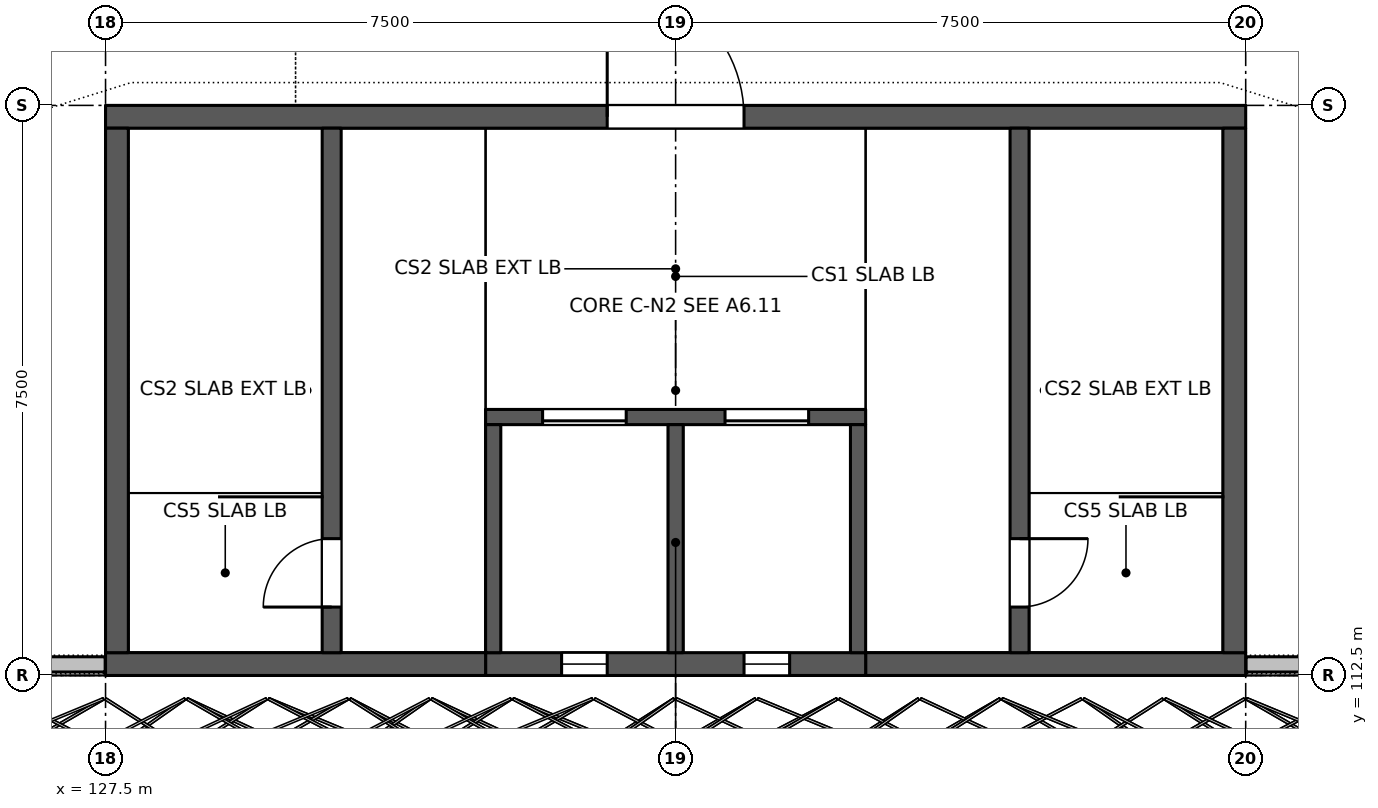
"""IFC4 building model, lengths in metres.
Left out: names, types, materials, properties, quantities, classifications, styles, units other than length and angle.
Written with IfcOpenShell. Run it as: python <this file> out.ifc"""

import sys

from ifc_helpers import new_model, si_unit, direction, frame, frame_2d, origin, place, context, subcontext, project, spatial, polyline, rectangle, outline, extrude, element, fill, save


model = new_model("IFC4")
c1 = context("Model", 3, precision=1e-05, world=origin(), true_north=direction((0.0, 1.0)))
c2 = subcontext(c1, "Body", "Model", "MODEL_VIEW")
j1 = project(units=[si_unit("LENGTHUNIT", "METRE"), si_unit("PLANEANGLEUNIT", "RADIAN")], contexts=[c1])
p1 = place(None, origin())
s1 = spatial("IfcSite", under=j1, at=p1, CompositionType="ELEMENT")
p2 = place(p1, origin())
s2 = spatial("IfcBuilding", under=s1, at=p2, CompositionType="ELEMENT")
p3 = place(p2, frame((0.0, 0.0, 13.2)))
s3 = spatial("IfcBuildingStorey", under=s2, at=p3, CompositionType="ELEMENT", Elevation=13.2)
for number, where, z_axis, x_axis in (
    (1, (120.002, 112.646, 0.0), (0.0, 0.0, 1.0), (1.0, 0.0, 0.0)),
    (2, (142.505, 112.646, 0.0), (0.0, 0.0, 1.0), (1.0, 0.0, 0.0)),
):
    element("IfcWall", number, at=place(p3, frame(where, z_axis=z_axis, x_axis=x_axis)), inside=s3, PredefinedType="SOLIDWALL", context=c2, shape_type="SweptSolid", body=[
        extrude(rectangle(XDim=7.493, YDim=0.2, at=frame_2d((3.747, 0.0))), origin(), (0.0, 0.0, 1.0), 1.2),
    ])
p4 = place(p3, frame((127.5, 119.85, 0.0), z_axis=(0.0, 0.0, 1.0), x_axis=(1.0, 0.0, 0.0)))
e3 = element("IfcWall", 3, at=p4, inside=s3, PredefinedType="SHEAR", context=c2, shape_type="SweptSolid", body=[
    extrude(rectangle(XDim=15.0, YDim=0.3, at=frame_2d((7.5, 0.0))), origin(), (0.0, 0.0, 1.0), 3.3),
])
p5 = place(p4, frame((6.6, 0.0, 0.0)))
e4 = element("IfcOpeningElement", 4, at=p5, cuts=e3, PredefinedType="OPENING", context=c2, shape_type="SweptSolid", body=[
    extrude(rectangle(XDim=1.8, YDim=2.1, at=frame_2d((0.9, 1.05))), frame((0.0, 0.16, 0.0), z_axis=(0.0, -1.0, 0.0), x_axis=(1.0, 0.0, 0.0)), (0.0, 0.0, 1.0), 0.32),
])
p6 = place(p3, frame((142.5, 112.65, 0.0), z_axis=(0.0, 0.0, 1.0), x_axis=(-1.0, 0.0, 0.0)))
e5 = element("IfcWall", 5, at=p6, inside=s3, PredefinedType="SHEAR", context=c2, shape_type="SweptSolid", body=[
    extrude(rectangle(XDim=5.0, YDim=0.3, at=frame_2d((2.5, 0.0))), origin(), (0.0, 0.0, 1.0), 3.875),
])
p7 = place(p3, frame((137.5, 112.65, 0.0), z_axis=(0.0, 0.0, 1.0), x_axis=(-1.0, 0.0, 0.0)))
e6 = element("IfcWall", 6, at=p7, inside=s3, PredefinedType="SHEAR", context=c2, shape_type="SweptSolid", body=[
    extrude(outline(polyline([(0.0, 0.0), (5.0, 0.0), (5.0, 4.8), (0.0, 7.8), (0.0, 0.0)])), frame((0.0, 0.15, 0.0), z_axis=(0.0, -1.0, 0.0), x_axis=(1.0, 0.0, 0.0)), (0.0, 0.0, 1.0), 0.3),
])
p8 = place(p7, frame((1.0, 0.0, 0.3)))
e7 = element("IfcOpeningElement", 7, at=p8, cuts=e6, PredefinedType="OPENING", context=c2, shape_type="SweptSolid", body=[
    extrude(rectangle(XDim=0.6, YDim=2.7, at=frame_2d((0.3, 1.35))), frame((0.0, 0.16, 0.0), z_axis=(0.0, -1.0, 0.0), x_axis=(1.0, 0.0, 0.0)), (0.0, 0.0, 1.0), 0.32),
])
p9 = place(p7, frame((3.4, 0.0, 0.3)))
e8 = element("IfcOpeningElement", 8, at=p9, cuts=e6, PredefinedType="OPENING", context=c2, shape_type="SweptSolid", body=[
    extrude(rectangle(XDim=0.6, YDim=2.7, at=frame_2d((0.3, 1.35))), frame((0.0, 0.16, 0.0), z_axis=(0.0, -1.0, 0.0), x_axis=(1.0, 0.0, 0.0)), (0.0, 0.0, 1.0), 0.32),
])
p10 = place(p3, frame((132.5, 112.65, 0.0), z_axis=(0.0, 0.0, 1.0), x_axis=(-1.0, 0.0, 0.0)))
e9 = element("IfcWall", 9, at=p10, inside=s3, PredefinedType="SHEAR", context=c2, shape_type="SweptSolid", body=[
    extrude(rectangle(XDim=5.0, YDim=0.3, at=frame_2d((2.5, 0.0))), origin(), (0.0, 0.0, 1.0), 3.875),
])
for number, where, z_axis, x_axis in (
    (10, (142.35, 119.7, 0.0), (0.0, 0.0, 1.0), (0.0, -1.0, 0.0)),
    (11, (127.65, 119.7, 0.0), (0.0, 0.0, 1.0), (0.0, -1.0, 0.0)),
):
    element("IfcWall", number, at=place(p3, frame(where, z_axis=z_axis, x_axis=x_axis)), inside=s3, PredefinedType="SHEAR", context=c2, shape_type="SweptSolid", body=[
        extrude(outline(polyline([(0.0, 0.0), (6.9, 0.0), (6.9, 3.875), (0.0, 3.3), (0.0, 0.0)])), frame((0.0, 0.15, 0.0), z_axis=(0.0, -1.0, 0.0), x_axis=(1.0, 0.0, 0.0)), (0.0, 0.0, 1.0), 0.3),
    ])
p11 = place(p3, frame((139.525, 119.7, 0.0), z_axis=(0.0, 0.0, 1.0), x_axis=(0.0, -1.0, 0.0)))
e12 = element("IfcWall", 12, at=p11, inside=s3, PredefinedType="STANDARD", context=c2, shape_type="SweptSolid", body=[
    extrude(outline(polyline([(0.0, 0.0), (6.9, 0.0), (6.9, 3.675), (0.0, 3.1), (0.0, 0.0)])), frame((0.0, 0.125, 0.0), z_axis=(0.0, -1.0, 0.0), x_axis=(1.0, 0.0, 0.0)), (0.0, 0.0, 1.0), 0.25),
])
p12 = place(p11, frame((5.4, 0.0, 0.0)))
e13 = element("IfcOpeningElement", 13, at=p12, cuts=e12, PredefinedType="OPENING", context=c2, shape_type="SweptSolid", body=[
    extrude(rectangle(XDim=0.9, YDim=2.1, at=frame_2d((0.45, 1.05))), frame((0.0, 0.135, 0.0), z_axis=(0.0, -1.0, 0.0), x_axis=(1.0, 0.0, 0.0)), (0.0, 0.0, 1.0), 0.27),
])
p13 = place(p3, frame((130.475, 112.8, 0.0), z_axis=(0.0, 0.0, 1.0), x_axis=(0.0, 1.0, 0.0)))
e14 = element("IfcWall", 14, at=p13, inside=s3, PredefinedType="STANDARD", context=c2, shape_type="SweptSolid", body=[
    extrude(outline(polyline([(0.0, 0.0), (6.9, 0.0), (6.9, 3.1), (0.0, 3.675), (0.0, 0.0)])), frame((0.0, 0.125, 0.0), z_axis=(0.0, -1.0, 0.0), x_axis=(1.0, 0.0, 0.0)), (0.0, 0.0, 1.0), 0.25),
])
p14 = place(p13, frame((0.6, 0.0, 0.0)))
e15 = element("IfcOpeningElement", 15, at=p14, cuts=e14, PredefinedType="OPENING", context=c2, shape_type="SweptSolid", body=[
    extrude(rectangle(XDim=0.9, YDim=2.1, at=frame_2d((0.45, 1.05))), frame((0.0, 0.135, 0.0), z_axis=(0.0, -1.0, 0.0), x_axis=(1.0, 0.0, 0.0)), (0.0, 0.0, 1.0), 0.27),
])
p15 = place(p3, frame((137.5, 115.9, 0.0), z_axis=(0.0, 0.0, 1.0), x_axis=(-1.0, 0.0, 0.0)))
e16 = element("IfcWall", 16, at=p15, inside=s3, PredefinedType="STANDARD", context=c2, shape_type="SweptSolid", body=[
    extrude(outline(polyline([(0.0, 0.0), (5.0, 0.0), (5.0, 4.8), (0.0, 7.8), (0.0, 0.0)])), frame((0.0, 0.1, 0.0), z_axis=(0.0, -1.0, 0.0), x_axis=(1.0, 0.0, 0.0)), (0.0, 0.0, 1.0), 0.2),
])
p16 = place(p15, frame((0.75, 0.0, 0.0)))
e17 = element("IfcOpeningElement", 17, at=p16, cuts=e16, PredefinedType="OPENING", context=c2, shape_type="SweptSolid", body=[
    extrude(rectangle(XDim=1.1, YDim=2.1, at=frame_2d((0.55, 1.05))), frame((0.0, 0.11, 0.0), z_axis=(0.0, -1.0, 0.0), x_axis=(1.0, 0.0, 0.0)), (0.0, 0.0, 1.0), 0.22),
])
p17 = place(p15, frame((3.15, 0.0, 0.0)))
e18 = element("IfcOpeningElement", 18, at=p17, cuts=e16, PredefinedType="OPENING", context=c2, shape_type="SweptSolid", body=[
    extrude(rectangle(XDim=1.1, YDim=2.1, at=frame_2d((0.55, 1.05))), frame((0.0, 0.11, 0.0), z_axis=(0.0, -1.0, 0.0), x_axis=(1.0, 0.0, 0.0)), (0.0, 0.0, 1.0), 0.22),
])
p18 = place(p3, frame((137.4, 115.8, 0.0), z_axis=(0.0, 0.0, 1.0), x_axis=(0.0, -1.0, 0.0)))
e19 = element("IfcWall", 19, at=p18, inside=s3, PredefinedType="STANDARD", context=c2, shape_type="SweptSolid", body=[
    extrude(rectangle(XDim=3.0, YDim=0.2, at=frame_2d((1.5, 0.0))), origin(), (0.0, 0.0, 1.0), 7.68),
])
p19 = place(p3, frame((135.0, 115.8, 0.0), z_axis=(0.0, 0.0, 1.0), x_axis=(0.0, -1.0, 0.0)))
e20 = element("IfcWall", 20, at=p19, inside=s3, PredefinedType="STANDARD", context=c2, shape_type="SweptSolid", body=[
    extrude(rectangle(XDim=3.0, YDim=0.2, at=frame_2d((1.5, 0.0))), origin(), (0.0, 0.0, 1.0), 6.24),
])
p20 = place(p3, frame((132.6, 115.8, 0.0), z_axis=(0.0, 0.0, 1.0), x_axis=(0.0, -1.0, 0.0)))
e21 = element("IfcWall", 21, at=p20, inside=s3, PredefinedType="STANDARD", context=c2, shape_type="SweptSolid", body=[
    extrude(rectangle(XDim=3.0, YDim=0.2, at=frame_2d((1.5, 0.0))), origin(), (0.0, 0.0, 1.0), 4.8),
])
p21 = place(p5, origin())
e22 = element("IfcDoor", 22, at=p21, inside=s3, OperationType="DOUBLE_DOOR_SINGLE_SWING", PredefinedType="DOOR", context=c2, shape_type="SweptSolid", body=[
    extrude(rectangle(XDim=1.8, YDim=2.1, at=frame_2d((0.9, 1.05))), frame((0.0, 0.025, 0.0), z_axis=(0.0, -1.0, 0.0), x_axis=(1.0, 0.0, 0.0)), (0.0, 0.0, 1.0), 0.05),
])
fill(e4, e22)
p22 = place(p12, origin())
e23 = element("IfcDoor", 23, at=p22, inside=s3, OperationType="SINGLE_SWING_LEFT", PredefinedType="DOOR", context=c2, shape_type="SweptSolid", body=[
    extrude(rectangle(XDim=0.9, YDim=2.1, at=frame_2d((0.45, 1.05))), frame((0.0, 0.025, 0.0), z_axis=(0.0, -1.0, 0.0), x_axis=(1.0, 0.0, 0.0)), (0.0, 0.0, 1.0), 0.05),
])
fill(e13, e23)
p23 = place(p14, origin())
e24 = element("IfcDoor", 24, at=p23, inside=s3, OperationType="SINGLE_SWING_RIGHT", PredefinedType="DOOR", context=c2, shape_type="SweptSolid", body=[
    extrude(rectangle(XDim=0.9, YDim=2.1, at=frame_2d((0.45, 1.05))), frame((0.0, 0.025, 0.0), z_axis=(0.0, -1.0, 0.0), x_axis=(1.0, 0.0, 0.0)), (0.0, 0.0, 1.0), 0.05),
])
fill(e15, e24)
p24 = place(p16, origin())
e25 = element("IfcDoor", 25, at=p24, inside=s3, OperationType="DOUBLE_DOOR_SLIDING", PredefinedType="DOOR", context=c2, shape_type="SweptSolid", body=[
    extrude(rectangle(XDim=1.1, YDim=2.1, at=frame_2d((0.55, 1.05))), frame((0.0, 0.025, 0.0), z_axis=(0.0, -1.0, 0.0), x_axis=(1.0, 0.0, 0.0)), (0.0, 0.0, 1.0), 0.05),
])
fill(e17, e25)
p25 = place(p17, origin())
e26 = element("IfcDoor", 26, at=p25, inside=s3, OperationType="DOUBLE_DOOR_SLIDING", PredefinedType="DOOR", context=c2, shape_type="SweptSolid", body=[
    extrude(rectangle(XDim=1.1, YDim=2.1, at=frame_2d((0.55, 1.05))), frame((0.0, 0.025, 0.0), z_axis=(0.0, -1.0, 0.0), x_axis=(1.0, 0.0, 0.0)), (0.0, 0.0, 1.0), 0.05),
])
fill(e18, e26)
p26 = place(p8, origin())
e27 = element("IfcWindow", 27, at=p26, inside=s3, PartitioningType="SINGLE_PANEL", PredefinedType="WINDOW", context=c2, shape_type="SweptSolid", body=[
    extrude(rectangle(XDim=0.6, YDim=2.7, at=frame_2d((0.3, 1.35))), frame((0.0, 0.03, 0.0), z_axis=(0.0, -1.0, 0.0), x_axis=(1.0, 0.0, 0.0)), (0.0, 0.0, 1.0), 0.06),
])
fill(e7, e27)
p27 = place(p9, origin())
e28 = element("IfcWindow", 28, at=p27, inside=s3, PartitioningType="SINGLE_PANEL", PredefinedType="WINDOW", context=c2, shape_type="SweptSolid", body=[
    extrude(rectangle(XDim=0.6, YDim=2.7, at=frame_2d((0.3, 1.35))), frame((0.0, 0.03, 0.0), z_axis=(0.0, -1.0, 0.0), x_axis=(1.0, 0.0, 0.0)), (0.0, 0.0, 1.0), 0.06),
])
fill(e8, e28)
save(model, sys.argv[1])
